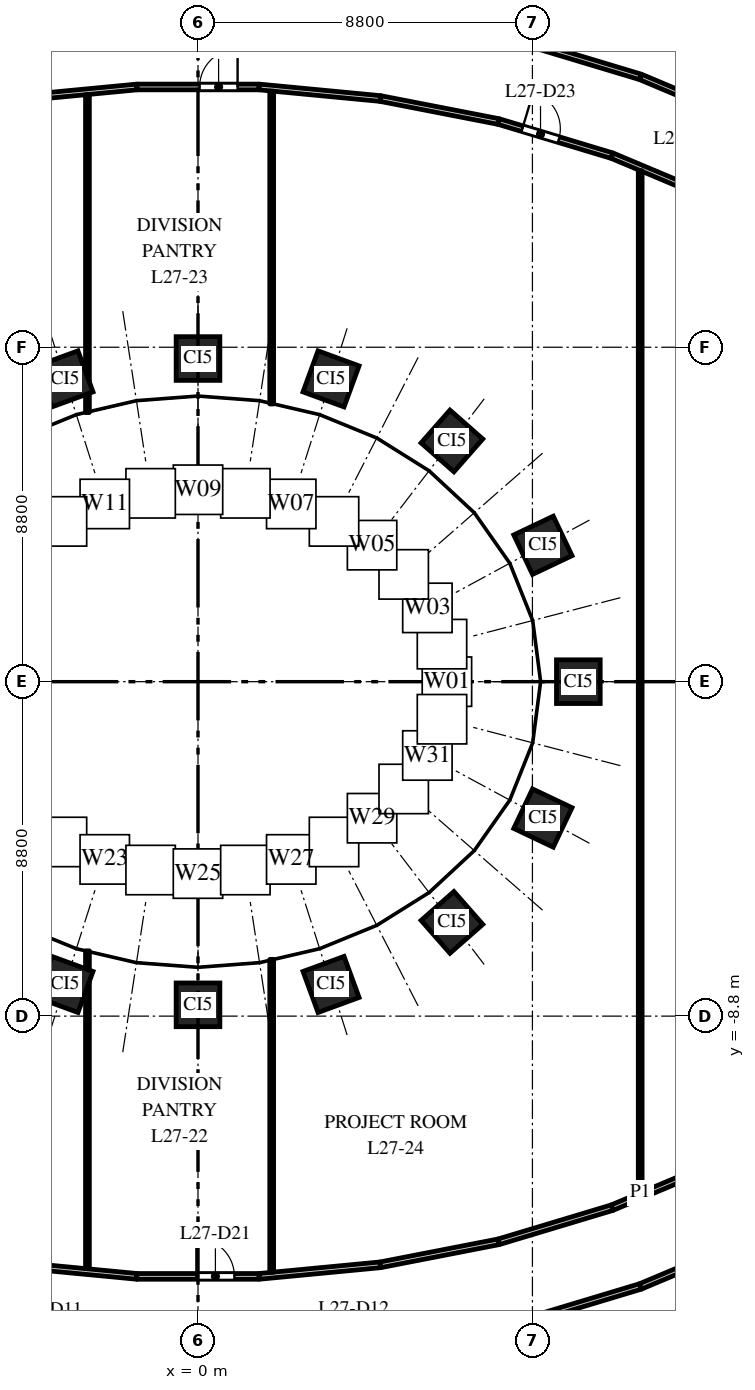
"""IFC4 building model, lengths in metres.
Left out: names, types, materials, properties, quantities, classifications, styles, units other than length and angle.
Written with IfcOpenShell. Run it as: python <this file> out.ifc"""

import sys

from ifc_helpers import new_model, si_unit, direction, frame, frame_2d, origin, origin_2d, place, context, subcontext, project, spatial, rectangle, extrude, element, fill, save


model = new_model("IFC4")
c1 = context("Model", 3, precision=1e-05, world=origin(), true_north=direction((0.0, 1.0)))
c2 = subcontext(c1, "Body", "Model", "MODEL_VIEW")
j1 = project(units=[si_unit("LENGTHUNIT", "METRE"), si_unit("PLANEANGLEUNIT", "RADIAN")], contexts=[c1])
p1 = place(None, origin())
s1 = spatial("IfcSite", under=j1, at=p1, CompositionType="ELEMENT")
p2 = place(p1, origin())
s2 = spatial("IfcBuilding", under=s1, at=p2, CompositionType="ELEMENT")
p3 = place(p2, frame((0.0, 0.0, 120.0)))
s3 = spatial("IfcBuildingStorey", under=s2, at=p3, CompositionType="ELEMENT", Elevation=120.0)
for number, where, z_axis, x_axis in (
    (1, (10.008, 0.0, 0.0), (0.0, 0.0, 1.0), (0.0, 1.0, 0.0)),
    (2, (9.076, 3.588, 0.0), (0.0, 0.0, 1.0), (-0.429, 0.903, 0.0)),
    (3, (6.682, 6.334, 0.0), (0.0, 0.0, 1.0), (-0.751, 0.66, 0.0)),
    (4, (3.501, 7.967, 0.0), (0.0, 0.0, 1.0), (-0.939, 0.344, 0.0)),
    (5, (0.0, 8.503, 0.0), (0.0, 0.0, 1.0), (-1.0, 0.0, 0.0)),
    (6, (-3.501, 7.967, 0.0), (0.0, 0.0, 1.0), (-0.939, -0.344, 0.0)),
    (7, (-3.501, -7.967, 0.0), (0.0, 0.0, 1.0), (0.939, -0.344, 0.0)),
    (8, (0.0, -8.503, 0.0), (0.0, 0.0, 1.0), (1.0, 0.0, 0.0)),
    (9, (3.501, -7.967, 0.0), (0.0, 0.0, 1.0), (0.939, 0.344, 0.0)),
    (10, (6.682, -6.334, 0.0), (0.0, 0.0, 1.0), (0.751, 0.66, 0.0)),
    (11, (9.076, -3.588, 0.0), (0.0, 0.0, 1.0), (0.429, 0.903, 0.0)),
):
    element("IfcColumn", number, at=place(p3, frame(where, z_axis=z_axis, x_axis=x_axis)), inside=s3, PredefinedType="COLUMN", context=c2, shape_type="SweptSolid", body=[
        extrude(rectangle(XDim=1.15, YDim=1.15, at=origin_2d()), origin(), (0.0, 0.0, 1.0), 4.0),
    ])
for number, where, z_axis, x_axis in (
    (12, (-4.798, -15.344, 0.0), (0.0, 0.0, 1.0), (0.995, -0.095, 0.0)),
    (13, (-4.798, 15.344, 0.0), (0.0, 0.0, 1.0), (0.995, 0.095, 0.0)),
):
    element("IfcWall", number, at=place(p3, frame(where, z_axis=z_axis, x_axis=x_axis)), inside=s3, PredefinedType="PARTITIONING", context=c2, shape_type="SweptSolid", body=[
        extrude(rectangle(XDim=3.205, YDim=0.15, at=frame_2d((1.602, 0.0))), origin(), (0.0, 0.0, 1.0), 3.7),
    ])
for number, where, z_axis, x_axis in (
    (14, (-2.909, -15.445, 0.0), (0.0, 0.0, 1.0), (0.0, 1.0, 0.0)),
    (15, (-2.909, 7.082, 0.0), (0.0, 0.0, 1.0), (0.0, 1.0, 0.0)),
):
    element("IfcWall", number, at=place(p3, frame(where, z_axis=z_axis, x_axis=x_axis)), inside=s3, PredefinedType="PARTITIONING", context=c2, shape_type="SweptSolid", body=[
        extrude(rectangle(XDim=8.363, YDim=0.1, at=frame_2d((4.182, 0.0))), origin(), (0.0, 0.0, 1.0), 2.9),
    ])
p4 = place(p3, frame((-1.608, -15.648, 0.0), z_axis=(0.0, 0.0, 1.0), x_axis=(1.0, 0.0, 0.0)))
e16 = element("IfcWall", 16, at=p4, inside=s3, PredefinedType="PARTITIONING", context=c2, shape_type="SweptSolid", body=[
    extrude(rectangle(XDim=3.216, YDim=0.15, at=frame_2d((1.608, 0.0))), origin(), (0.0, 0.0, 1.0), 2.85),
])
p5 = place(p4, frame((1.566, 0.0, 0.0)))
e17 = element("IfcOpeningElement", 17, at=p5, cuts=e16, PredefinedType="OPENING", context=c2, shape_type="SweptSolid", body=[
    extrude(rectangle(XDim=1.0, YDim=2.1, at=frame_2d((0.5, 1.05))), frame((0.0, 0.085, 0.0), z_axis=(0.0, -1.0, 0.0), x_axis=(1.0, 0.0, 0.0)), (0.0, 0.0, 1.0), 0.17),
])
p6 = place(p3, frame((-1.608, 15.648, 0.0), z_axis=(0.0, 0.0, 1.0), x_axis=(1.0, 0.0, 0.0)))
e18 = element("IfcWall", 18, at=p6, inside=s3, PredefinedType="PARTITIONING", context=c2, shape_type="SweptSolid", body=[
    extrude(rectangle(XDim=3.216, YDim=0.15, at=frame_2d((1.608, 0.0))), origin(), (0.0, 0.0, 1.0), 2.85),
])
p7 = place(p6, frame((1.65, 0.0, 0.0)))
e19 = element("IfcOpeningElement", 19, at=p7, cuts=e18, PredefinedType="OPENING", context=c2, shape_type="SweptSolid", body=[
    extrude(rectangle(XDim=1.0, YDim=2.1, at=frame_2d((0.5, 1.05))), frame((0.0, 0.085, 0.0), z_axis=(0.0, -1.0, 0.0), x_axis=(1.0, 0.0, 0.0)), (0.0, 0.0, 1.0), 0.17),
])
for number, where, z_axis, x_axis in (
    (20, (1.608, -15.648, 0.0), (0.0, 0.0, 1.0), (0.995, 0.095, 0.0)),
    (21, (1.608, 15.648, 0.0), (0.0, 0.0, 1.0), (0.995, -0.095, 0.0)),
):
    element("IfcWall", number, at=place(p3, frame(where, z_axis=z_axis, x_axis=x_axis)), inside=s3, PredefinedType="PARTITIONING", context=c2, shape_type="SweptSolid", body=[
        extrude(rectangle(XDim=3.205, YDim=0.15, at=frame_2d((1.602, 0.0))), origin(), (0.0, 0.0, 1.0), 2.85),
    ])
for number, where, z_axis, x_axis in (
    (22, (1.939, -15.537, 0.0), (0.0, 0.0, 1.0), (0.0, 1.0, 0.0)),
    (23, (1.939, 7.307, 0.0), (0.0, 0.0, 1.0), (0.0, 1.0, 0.0)),
):
    element("IfcWall", number, at=place(p3, frame(where, z_axis=z_axis, x_axis=x_axis)), inside=s3, PredefinedType="PARTITIONING", context=c2, shape_type="SweptSolid", body=[
        extrude(rectangle(XDim=8.23, YDim=0.1, at=frame_2d((4.115, 0.0))), origin(), (0.0, 0.0, 1.0), 2.85),
    ])
for number, where, z_axis, x_axis in (
    (24, (4.798, -15.344, 0.0), (0.0, 0.0, 1.0), (0.982, 0.191, 0.0)),
    (25, (4.798, 15.344, 0.0), (0.0, 0.0, 1.0), (0.982, -0.191, 0.0)),
):
    element("IfcWall", number, at=place(p3, frame(where, z_axis=z_axis, x_axis=x_axis)), inside=s3, PredefinedType="PARTITIONING", context=c2, shape_type="SweptSolid", body=[
        extrude(rectangle(XDim=3.172, YDim=0.15, at=frame_2d((1.586, 0.0))), origin(), (0.0, 0.0, 1.0), 3.7),
    ])
p8 = place(p3, frame((7.912, -14.738, 0.0), z_axis=(0.0, 0.0, 1.0), x_axis=(0.957606118849, 0.28808075455, 0.0)))
e26 = element("IfcWall", 26, at=p8, inside=s3, PredefinedType="PARTITIONING", context=c2, shape_type="SweptSolid", body=[
    extrude(rectangle(XDim=3.117, YDim=0.15, at=frame_2d((1.559, 0.0))), origin(), (0.0, 0.0, 1.0), 2.85),
])
p9 = place(p3, frame((7.912, 14.738, 0.0), z_axis=(0.0, 0.0, 1.0), x_axis=(0.957606118849, -0.28808075455, 0.0)))
e27 = element("IfcWall", 27, at=p9, inside=s3, PredefinedType="PARTITIONING", context=c2, shape_type="SweptSolid", body=[
    extrude(rectangle(XDim=3.117, YDim=0.15, at=frame_2d((1.559, 0.0))), origin(), (0.0, 0.0, 1.0), 2.85),
])
p10 = place(p9, frame((0.65, 0.0, 0.0)))
e28 = element("IfcOpeningElement", 28, at=p10, cuts=e27, PredefinedType="OPENING", context=c2, shape_type="SweptSolid", body=[
    extrude(rectangle(XDim=1.0, YDim=2.1, at=frame_2d((0.5, 1.05))), frame((0.0, 0.085, 0.0), z_axis=(0.0, -1.0, 0.0), x_axis=(1.0, 0.0, 0.0)), (0.0, 0.0, 1.0), 0.17),
])
for number, where, z_axis, x_axis in (
    (29, (8.44, -16.877, 0.0), (0.0, 0.0, 1.0), (0.958, 0.288, 0.0)),
    (30, (8.44, 16.877, 0.0), (0.0, 0.0, 1.0), (0.958, -0.288, 0.0)),
):
    element("IfcWall", number, at=place(p3, frame(where, z_axis=z_axis, x_axis=x_axis)), inside=s3, PredefinedType="PARTITIONING", context=c2, shape_type="SweptSolid", body=[
        extrude(rectangle(XDim=3.345, YDim=0.15, at=frame_2d((1.672, 0.0))), origin(), (0.0, 0.0, 1.0), 2.85),
    ])
for number, where, z_axis, x_axis in (
    (31, (10.897, -13.84, 0.0), (0.0, 0.0, 1.0), (0.922, 0.388, 0.0)),
    (32, (10.897, 13.84, 0.0), (0.0, 0.0, 1.0), (0.922, -0.388, 0.0)),
):
    element("IfcWall", number, at=place(p3, frame(where, z_axis=z_axis, x_axis=x_axis)), inside=s3, PredefinedType="PARTITIONING", context=c2, shape_type="SweptSolid", body=[
        extrude(rectangle(XDim=3.038, YDim=0.15, at=frame_2d((1.519, 0.0))), origin(), (0.0, 0.0, 1.0), 3.7),
    ])
p11 = place(p3, frame((11.636, -13.444, 0.0), z_axis=(0.0, 0.0, 1.0), x_axis=(0.0, 1.0, 0.0)))
e33 = element("IfcWall", 33, at=p11, inside=s3, PredefinedType="PARTITIONING", context=c2, shape_type="SweptSolid", body=[
    extrude(rectangle(XDim=26.888, YDim=0.1, at=frame_2d((13.444, 0.0))), origin(), (0.0, 0.0, 1.0), 2.75),
])
p12 = place(p3, frame((11.643, -15.913, 0.0), z_axis=(0.0, 0.0, 1.0), x_axis=(0.921789499058, 0.38769075231, 0.0)))
e34 = element("IfcWall", 34, at=p12, inside=s3, PredefinedType="PARTITIONING", context=c2, shape_type="SweptSolid", body=[
    extrude(rectangle(XDim=3.278, YDim=0.15, at=frame_2d((1.639, 0.0))), origin(), (0.0, 0.0, 1.0), 3.7),
])
p13 = place(p12, frame((1.65, 0.0, 0.0)))
e35 = element("IfcOpeningElement", 35, at=p13, cuts=e34, PredefinedType="OPENING", context=c2, shape_type="SweptSolid", body=[
    extrude(rectangle(XDim=1.0, YDim=2.1, at=frame_2d((0.5, 1.05))), frame((0.0, 0.085, 0.0), z_axis=(0.0, -1.0, 0.0), x_axis=(1.0, 0.0, 0.0)), (0.0, 0.0, 1.0), 0.17),
])
p14 = place(p3, frame((11.643, 15.913, 0.0), z_axis=(0.0, 0.0, 1.0), x_axis=(0.921789499058, -0.38769075231, 0.0)))
e36 = element("IfcWall", 36, at=p14, inside=s3, PredefinedType="PARTITIONING", context=c2, shape_type="SweptSolid", body=[
    extrude(rectangle(XDim=3.278, YDim=0.15, at=frame_2d((1.639, 0.0))), origin(), (0.0, 0.0, 1.0), 3.7),
])
p15 = place(p5, origin())
e37 = element("IfcDoor", 37, at=p15, inside=s3, OperationType="SINGLE_SWING_LEFT", PredefinedType="DOOR", context=c2, shape_type="SweptSolid", body=[
    extrude(rectangle(XDim=1.0, YDim=2.1, at=frame_2d((0.5, 1.05))), frame((0.0, 0.025, 0.0), z_axis=(0.0, -1.0, 0.0), x_axis=(1.0, 0.0, 0.0)), (0.0, 0.0, 1.0), 0.05),
])
fill(e17, e37)
p16 = place(p7, origin())
e38 = element("IfcDoor", 38, at=p16, inside=s3, OperationType="SINGLE_SWING_RIGHT", PredefinedType="DOOR", context=c2, shape_type="SweptSolid", body=[
    extrude(rectangle(XDim=1.0, YDim=2.1, at=frame_2d((0.5, 1.05))), frame((0.0, 0.025, 0.0), z_axis=(0.0, -1.0, 0.0), x_axis=(1.0, 0.0, 0.0)), (0.0, 0.0, 1.0), 0.05),
])
fill(e19, e38)
p17 = place(p10, origin())
e39 = element("IfcDoor", 39, at=p17, inside=s3, OperationType="SINGLE_SWING_LEFT", PredefinedType="DOOR", context=c2, shape_type="SweptSolid", body=[
    extrude(rectangle(XDim=1.0, YDim=2.1, at=frame_2d((0.5, 1.05))), frame((0.0, 0.025, 0.0), z_axis=(0.0, -1.0, 0.0), x_axis=(1.0, 0.0, 0.0)), (0.0, 0.0, 1.0), 0.05),
])
fill(e28, e39)
save(model, sys.argv[1])
